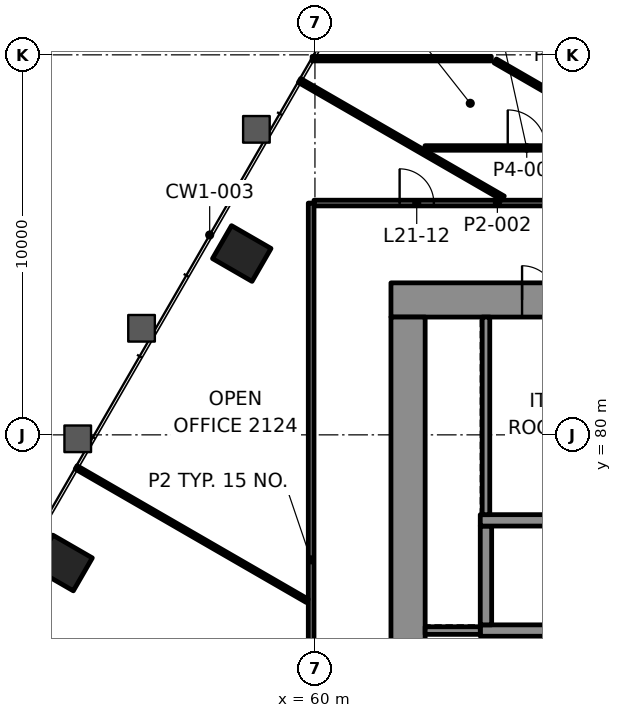
"""IFC4 building model, lengths in metres.
Left out: names, types, materials, properties, quantities, classifications, styles, units other than length and angle.
Written with IfcOpenShell. Run it as: python <this file> out.ifc"""

import sys

from ifc_helpers import new_model, si_unit, direction, frame, frame_2d, origin, origin_2d, place, context, subcontext, project, spatial, rectangle, extrude, element, fill, save


model = new_model("IFC4")
c1 = context("Model", 3, precision=1e-05, world=origin(), true_north=direction((0.0, 1.0)))
c2 = subcontext(c1, "Body", "Model", "MODEL_VIEW")
j1 = project(units=[si_unit("LENGTHUNIT", "METRE"), si_unit("PLANEANGLEUNIT", "RADIAN")], contexts=[c1])
p1 = place(None, origin())
s1 = spatial("IfcSite", under=j1, at=p1, CompositionType="ELEMENT")
p2 = place(p1, origin())
s2 = spatial("IfcBuilding", under=s1, at=p2, CompositionType="ELEMENT")
p3 = place(p2, frame((0.0, 0.0, 94.6)))
s3 = spatial("IfcBuildingStorey", under=s2, at=p3, CompositionType="ELEMENT", Elevation=94.6)
for number, where, z_axis, x_axis in (
    (1, (58.074, 84.772, -0.0), (0.0, 0.0, 1.0), (-0.5, -0.866, 0.0)),
    (2, (53.373, 76.628, -0.0), (0.0, 0.0, 1.0), (-0.5, -0.866, 0.0)),
):
    element("IfcColumn", number, at=place(p3, frame(where, z_axis=z_axis, x_axis=x_axis)), inside=s3, PredefinedType="COLUMN", context=c2, shape_type="SweptSolid", body=[
        extrude(rectangle(XDim=1.0, YDim=1.2, at=origin_2d()), origin(), (0.0, 0.0, 1.0), 4.2),
    ])
p4 = place(p3, frame((62.0, 83.55, 0.0), z_axis=(0.0, 0.0, 1.0), x_axis=(1.0, 0.0, 0.0)))
e3 = element("IfcWall", 3, at=p4, inside=s3, PredefinedType="SHEAR", context=c2, shape_type="SweptSolid", body=[
    extrude(rectangle(XDim=26.0, YDim=0.9, at=frame_2d((13.0, 0.0))), origin(), (0.0, 0.0, 1.0), 4.0),
])
p5 = place(p4, frame((5.695, 0.0, 0.0)))
e4 = element("IfcOpeningElement", 4, at=p5, cuts=e3, PredefinedType="OPENING", context=c2, shape_type="SweptSolid", body=[
    extrude(rectangle(XDim=1.0, YDim=2.1, at=frame_2d((0.5, 1.05))), frame((0.0, 0.46, 0.0), z_axis=(0.0, -1.0, 0.0), x_axis=(1.0, 0.0, 0.0)), (0.0, 0.0, 1.0), 0.92),
])
p6 = place(p4, frame((19.505, 0.0, 0.0)))
e5 = element("IfcOpeningElement", 5, at=p6, cuts=e3, PredefinedType="OPENING", context=c2, shape_type="SweptSolid", body=[
    extrude(rectangle(XDim=1.0, YDim=2.1, at=frame_2d((0.5, 1.05))), frame((0.0, 0.46, 0.0), z_axis=(0.0, -1.0, 0.0), x_axis=(1.0, 0.0, 0.0)), (0.0, 0.0, 1.0), 0.92),
])
p7 = place(p4, frame((3.45, 0.0, 0.0)))
e6 = element("IfcOpeningElement", 6, at=p7, cuts=e3, PredefinedType="OPENING", context=c2, shape_type="SweptSolid", body=[
    extrude(rectangle(XDim=0.9, YDim=2.1, at=frame_2d((0.45, 1.05))), frame((0.0, 0.46, 0.0), z_axis=(0.0, -1.0, 0.0), x_axis=(1.0, 0.0, 0.0)), (0.0, 0.0, 1.0), 0.92),
])
p8 = place(p4, frame((12.65, 0.0, 0.0)))
e7 = element("IfcOpeningElement", 7, at=p8, cuts=e3, PredefinedType="OPENING", context=c2, shape_type="SweptSolid", body=[
    extrude(rectangle(XDim=0.9, YDim=2.1, at=frame_2d((0.45, 1.05))), frame((0.0, 0.46, 0.0), z_axis=(0.0, -1.0, 0.0), x_axis=(1.0, 0.0, 0.0)), (0.0, 0.0, 1.0), 0.92),
])
p9 = place(p4, frame((22.55, 0.0, 0.0)))
e8 = element("IfcOpeningElement", 8, at=p9, cuts=e3, PredefinedType="OPENING", context=c2, shape_type="SweptSolid", body=[
    extrude(rectangle(XDim=0.9, YDim=2.1, at=frame_2d((0.45, 1.05))), frame((0.0, 0.46, 0.0), z_axis=(0.0, -1.0, 0.0), x_axis=(1.0, 0.0, 0.0)), (0.0, 0.0, 1.0), 0.92),
])
p10 = place(p3, frame((62.45, 66.9, 0.0), z_axis=(0.0, 0.0, 1.0), x_axis=(0.0, 1.0, 0.0)))
e9 = element("IfcWall", 9, at=p10, inside=s3, PredefinedType="SHEAR", context=c2, shape_type="SweptSolid", body=[
    extrude(rectangle(XDim=16.2, YDim=0.9, at=frame_2d((8.1, 0.0))), origin(), (0.0, 0.0, 1.0), 4.0),
])
p11 = place(p10, frame((5.5, 0.0, 0.0)))
e10 = element("IfcOpeningElement", 10, at=p11, cuts=e9, PredefinedType="OPENING", context=c2, shape_type="SweptSolid", body=[
    extrude(rectangle(XDim=1.8, YDim=2.1, at=frame_2d((0.9, 1.05))), frame((0.0, 0.46, 0.0), z_axis=(0.0, -1.0, 0.0), x_axis=(1.0, 0.0, 0.0)), (0.0, 0.0, 1.0), 0.92),
])
p12 = place(p3, frame((64.35, 74.85, 0.0), z_axis=(0.0, 0.0, 1.0), x_axis=(1.0, 0.0, 0.0)))
e11 = element("IfcWall", 11, at=p12, inside=s3, PredefinedType="SHEAR", context=c2, shape_type="SweptSolid", body=[
    extrude(rectangle(XDim=3.1, YDim=0.3, at=frame_2d((1.55, 0.0))), origin(), (0.0, 0.0, 1.0), 4.0),
])
p13 = place(p3, frame((64.5, 75.0, 0.0), z_axis=(0.0, 0.0, 1.0), x_axis=(0.0, 1.0, 0.0)))
e12 = element("IfcWall", 12, at=p13, inside=s3, PredefinedType="SHEAR", context=c2, shape_type="SweptSolid", body=[
    extrude(rectangle(XDim=2.6, YDim=0.3, at=frame_2d((1.3, 0.0))), origin(), (0.0, 0.0, 1.0), 4.0),
])
p14 = place(p3, frame((64.35, 77.75, 0.0), z_axis=(0.0, 0.0, 1.0), x_axis=(1.0, 0.0, 0.0)))
e13 = element("IfcWall", 13, at=p14, inside=s3, PredefinedType="SHEAR", context=c2, shape_type="SweptSolid", body=[
    extrude(rectangle(XDim=22.75, YDim=0.3, at=frame_2d((11.375, 0.0))), origin(), (0.0, 0.0, 1.0), 4.0),
])
p15 = place(p14, frame((3.345, 0.0, 0.0)))
e14 = element("IfcOpeningElement", 14, at=p15, cuts=e13, PredefinedType="OPENING", context=c2, shape_type="SweptSolid", body=[
    extrude(rectangle(XDim=1.0, YDim=2.1, at=frame_2d((0.5, 1.05))), frame((0.0, 0.16, 0.0), z_axis=(0.0, -1.0, 0.0), x_axis=(1.0, 0.0, 0.0)), (0.0, 0.0, 1.0), 0.32),
])
p16 = place(p3, frame((59.976, 86.1, 0.0), z_axis=(0.0, 0.0, 1.0), x_axis=(1.0, 0.0, 0.0)))
e15 = element("IfcWall", 15, at=p16, inside=s3, PredefinedType="PARTITIONING", context=c2, shape_type="SweptSolid", body=[
    extrude(rectangle(XDim=9.649, YDim=0.15, at=frame_2d((4.825, 0.0))), origin(), (0.0, 0.0, 1.0), 3.4),
])
p17 = place(p16, frame((2.252, 0.0, 0.0)))
e16 = element("IfcOpeningElement", 16, at=p17, cuts=e15, PredefinedType="OPENING", context=c2, shape_type="SweptSolid", body=[
    extrude(rectangle(XDim=0.9, YDim=2.1, at=frame_2d((0.45, 1.05))), frame((0.0, 0.085, 0.0), z_axis=(0.0, -1.0, 0.0), x_axis=(1.0, 0.0, 0.0)), (0.0, 0.0, 1.0), 0.17),
])
p18 = place(p16, frame((6.723, 0.0, 0.0)))
e17 = element("IfcOpeningElement", 17, at=p18, cuts=e15, PredefinedType="OPENING", context=c2, shape_type="SweptSolid", body=[
    extrude(rectangle(XDim=1.2, YDim=2.1, at=frame_2d((0.6, 1.05))), frame((0.0, 0.085, 0.0), z_axis=(0.0, -1.0, 0.0), x_axis=(1.0, 0.0, 0.0)), (0.0, 0.0, 1.0), 0.17),
])
p19 = place(p3, frame((62.896, 87.55, 0.0), z_axis=(0.0, 0.0, 1.0), x_axis=(1.0, 0.0, 0.0)))
e18 = element("IfcWall", 18, at=p19, inside=s3, PredefinedType="PARTITIONING", context=c2, shape_type="SweptSolid", body=[
    extrude(rectangle(XDim=5.354, YDim=0.12, at=frame_2d((2.677, 0.0))), origin(), (0.0, 0.0, 1.0), 3.4),
])
p20 = place(p19, frame((2.177, 0.0, 0.0)))
e19 = element("IfcOpeningElement", 19, at=p20, cuts=e18, PredefinedType="OPENING", context=c2, shape_type="SweptSolid", body=[
    extrude(rectangle(XDim=1.0, YDim=2.1, at=frame_2d((0.5, 1.05))), frame((0.0, 0.07, 0.0), z_axis=(0.0, -1.0, 0.0), x_axis=(1.0, 0.0, 0.0)), (0.0, 0.0, 1.0), 0.14),
])
p21 = place(p3, frame((59.927, 89.9, 0.0), z_axis=(0.0, 0.0, 1.0), x_axis=(1.0, 0.0, 0.0)))
e20 = element("IfcWall", 20, at=p21, inside=s3, PredefinedType="PARTITIONING", context=c2, shape_type="SweptSolid", body=[
    extrude(rectangle(XDim=4.714, YDim=0.12, at=frame_2d((2.357, 0.0))), origin(), (0.0, 0.0, 1.0), 3.165),
])
p22 = place(p3, frame((59.9, 67.321, 0.0), z_axis=(0.0, 0.0, 1.0), x_axis=(0.0, 1.0, 0.0)))
e21 = element("IfcWall", 21, at=p22, inside=s3, PredefinedType="PARTITIONING", context=c2, shape_type="SweptSolid", body=[
    extrude(rectangle(XDim=18.778, YDim=0.15, at=frame_2d((9.389, 0.0))), origin(), (0.0, 0.0, 1.0), 3.4),
])
p23 = place(p3, frame((68.155, 87.871, 0.0), z_axis=(0.0, 0.0, 1.0), x_axis=(-0.866041060244, 0.499972881236, 0.0)))
e22 = element("IfcWall", 22, at=p23, inside=s3, PredefinedType="PARTITIONING", context=c2, shape_type="SweptSolid", body=[
    extrude(rectangle(XDim=3.938, YDim=0.12, at=frame_2d((1.969, 0.0))), origin(), (0.0, 0.0, 1.0), 3.4),
])
p24 = place(p3, frame((64.953, 86.23, 0.0), z_axis=(0.0, 0.0, 1.0), x_axis=(-0.866029863972, 0.499992274648, 0.0)))
e23 = element("IfcWall", 23, at=p24, inside=s3, PredefinedType="PARTITIONING", context=c2, shape_type="SweptSolid", body=[
    extrude(rectangle(XDim=6.188, YDim=0.12, at=frame_2d((3.094, 0.0))), origin(), (0.0, 0.0, 1.0), 3.165),
])
p25 = place(p3, frame((59.799, 75.632, 0.0), z_axis=(0.0, 0.0, 1.0), x_axis=(-0.866018287837, 0.500012324981, 0.0)))
e24 = element("IfcWall", 24, at=p25, inside=s3, PredefinedType="PARTITIONING", context=c2, shape_type="SweptSolid", body=[
    extrude(rectangle(XDim=7.023, YDim=0.1, at=frame_2d((3.512, 0.0))), origin(), (0.0, 0.0, 1.0), 3.165),
])
p26 = place(p3, frame((62.9, 74.85, 0.0), z_axis=(0.0, 0.0, 1.0), x_axis=(1.0, 0.0, 0.0)))
e25 = element("IfcWall", 25, at=p26, inside=s3, PredefinedType="PARTITIONING", context=c2, shape_type="SweptSolid", body=[
    extrude(rectangle(XDim=1.45, YDim=0.2, at=frame_2d((0.725, 0.0))), origin(), (0.0, 0.0, 1.0), 4.0),
])
p27 = place(p3, frame((64.5, 77.9, 0.0), z_axis=(0.0, 0.0, 1.0), x_axis=(0.0, 1.0, 0.0)))
e26 = element("IfcWall", 26, at=p27, inside=s3, PredefinedType="PARTITIONING", context=c2, shape_type="SweptSolid", body=[
    extrude(rectangle(XDim=5.2, YDim=0.2, at=frame_2d((2.6, 0.0))), origin(), (0.0, 0.0, 1.0), 4.0),
])
p28 = place(p17, origin())
e27 = element("IfcDoor", 27, at=p28, inside=s3, OperationType="SINGLE_SWING_LEFT", PredefinedType="DOOR", context=c2, shape_type="SweptSolid", body=[
    extrude(rectangle(XDim=0.9, YDim=2.1, at=frame_2d((0.45, 1.05))), frame((0.0, 0.025, 0.0), z_axis=(0.0, -1.0, 0.0), x_axis=(1.0, 0.0, 0.0)), (0.0, 0.0, 1.0), 0.05),
])
fill(e16, e27)
p29 = place(p20, origin())
e28 = element("IfcDoor", 28, at=p29, inside=s3, OperationType="SINGLE_SWING_RIGHT", PredefinedType="DOOR", context=c2, shape_type="SweptSolid", body=[
    extrude(rectangle(XDim=1.0, YDim=2.1, at=frame_2d((0.5, 1.05))), frame((0.0, 0.025, 0.0), z_axis=(0.0, -1.0, 0.0), x_axis=(1.0, 0.0, 0.0)), (0.0, 0.0, 1.0), 0.05),
])
fill(e19, e28)
p30 = place(p7, origin())
e29 = element("IfcDoor", 29, at=p30, inside=s3, OperationType="SINGLE_SWING_RIGHT", PredefinedType="DOOR", context=c2, shape_type="SweptSolid", body=[
    extrude(rectangle(XDim=0.9, YDim=2.1, at=frame_2d((0.45, 1.05))), frame((0.0, 0.17, 0.0), z_axis=(0.0, -1.0, 0.0), x_axis=(1.0, 0.0, 0.0)), (0.0, 0.0, 1.0), 0.34),
])
fill(e6, e29)
save(model, sys.argv[1])
